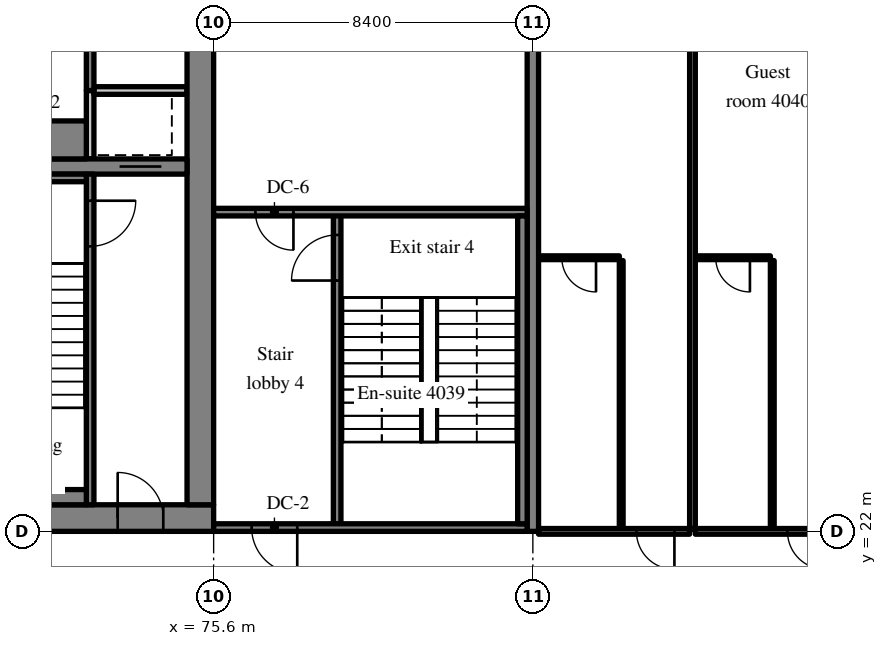
"""IFC4 building model, lengths in metres.
Left out: names, types, materials, properties, quantities, classifications, styles, units other than length and angle.
Written with IfcOpenShell. Run it as: python <this file> out.ifc"""

import sys

from ifc_helpers import new_model, si_unit, direction, frame, frame_2d, origin, place, context, subcontext, project, spatial, rectangle, extrude, source, transform, mapped, element, fill, save


model = new_model("IFC4")
c1 = context("Model", 3, precision=1e-05, world=origin(), true_north=direction((0.0, 1.0)))
c2 = subcontext(c1, "Body", "Model", "MODEL_VIEW")
j1 = project(units=[si_unit("LENGTHUNIT", "METRE"), si_unit("PLANEANGLEUNIT", "RADIAN")], contexts=[c1])
p1 = place(None, origin())
s1 = spatial("IfcSite", under=j1, at=p1, CompositionType="ELEMENT")
p2 = place(p1, origin())
s2 = spatial("IfcBuilding", under=s1, at=p2, CompositionType="ELEMENT")
p3 = place(p2, frame((0.0, 0.0, 166.8)))
s3 = spatial("IfcBuildingStorey", under=s2, at=p3, CompositionType="ELEMENT", Elevation=166.8)
m1 = source(origin(), c2, "Body", "SweptSolid", [
    extrude(rectangle(XDim=50.4, YDim=0.7, at=frame_2d((25.2, 0.0))), origin(), (0.0, 0.0, 1.0), 3.52),
])
p4 = place(p3, frame((25.2, 22.35, 0.0), z_axis=(0.0, 0.0, 1.0), x_axis=(1.0, 0.0, 0.0)))
e1 = element("IfcWall", 1, at=p4, inside=s3, PredefinedType="SHEAR", context=c2, shape_type="MappedRepresentation", body=[
    mapped(m1, transform((0.0, 0.0, 0.0), scale=1.0)),
])
m2 = source(origin(), c2, "Body", "SweptSolid", [
    extrude(rectangle(XDim=1.8, YDim=2.1, at=frame_2d((0.9, 1.05))), frame((0.0, 0.36, 0.0), z_axis=(0.0, -1.0, 0.0), x_axis=(1.0, 0.0, 0.0)), (0.0, 0.0, 1.0), 0.72),
])
p5 = place(p4, frame((15.9, 0.0, 0.0)))
e2 = element("IfcOpeningElement", 2, at=p5, cuts=e1, PredefinedType="OPENING", context=c2, shape_type="MappedRepresentation", body=[
    mapped(m2, transform((0.0, 0.0, 0.0), scale=1.0)),
])
m3 = source(origin(), c2, "Body", "SweptSolid", [
    extrude(rectangle(XDim=0.9, YDim=2.1, at=frame_2d((0.45, 1.05))), frame((0.0, 0.36, 0.0), z_axis=(0.0, -1.0, 0.0), x_axis=(1.0, 0.0, 0.0)), (0.0, 0.0, 1.0), 0.72),
])
p6 = place(p4, frame((9.7, 0.0, 0.0)))
e3 = element("IfcOpeningElement", 3, at=p6, cuts=e1, PredefinedType="OPENING", context=c2, shape_type="MappedRepresentation", body=[
    mapped(m3, transform((0.0, 0.0, 0.0), scale=1.0)),
])
p7 = place(p4, frame((21.5, 0.0, 0.0)))
e4 = element("IfcOpeningElement", 4, at=p7, cuts=e1, PredefinedType="OPENING", context=c2, shape_type="MappedRepresentation", body=[
    mapped(m3, transform((0.0, 0.0, 0.0), scale=1.0)),
])
p8 = place(p4, frame((32.7, 0.0, 0.0)))
e5 = element("IfcOpeningElement", 5, at=p8, cuts=e1, PredefinedType="OPENING", context=c2, shape_type="MappedRepresentation", body=[
    mapped(m2, transform((0.0, 0.0, 0.0), scale=1.0)),
])
m4 = source(origin(), c2, "Body", "SweptSolid", [
    extrude(rectangle(XDim=1.2, YDim=2.1, at=frame_2d((0.6, 1.05))), frame((0.0, 0.36, 0.0), z_axis=(0.0, -1.0, 0.0), x_axis=(1.0, 0.0, 0.0)), (0.0, 0.0, 1.0), 0.72),
])
p9 = place(p4, frame((6.475, 0.0, 0.0)))
e6 = element("IfcOpeningElement", 6, at=p9, cuts=e1, PredefinedType="OPENING", context=c2, shape_type="MappedRepresentation", body=[
    mapped(m4, transform((0.0, 0.0, 0.0), scale=1.0)),
])
p10 = place(p4, frame((47.875, 0.0, 0.0)))
e7 = element("IfcOpeningElement", 7, at=p10, cuts=e1, PredefinedType="OPENING", context=c2, shape_type="MappedRepresentation", body=[
    mapped(m4, transform((0.0, 0.0, 0.0), scale=1.0)),
])
m5 = source(origin(), c2, "Body", "SweptSolid", [
    extrude(rectangle(XDim=18.6, YDim=0.7, at=frame_2d((9.3, 0.0))), origin(), (0.0, 0.0, 1.0), 3.52),
])
p11 = place(p3, frame((75.25, 22.7, 0.0), z_axis=(0.0, 0.0, 1.0), x_axis=(0.0, 1.0, 0.0)))
e8 = element("IfcWall", 8, at=p11, inside=s3, PredefinedType="SHEAR", context=c2, shape_type="MappedRepresentation", body=[
    mapped(m5, transform((0.0, 0.0, 0.0), scale=1.0)),
])
p12 = place(p11, frame((12.7, 0.0, 0.0)))
e9 = element("IfcOpeningElement", 9, at=p12, cuts=e8, PredefinedType="OPENING", context=c2, shape_type="MappedRepresentation", body=[
    mapped(m4, transform((0.0, 0.0, 0.0), scale=1.0)),
])
m6 = source(origin(), c2, "Body", "SweptSolid", [
    extrude(rectangle(XDim=7.5, YDim=0.4, at=frame_2d((3.75, 0.0))), origin(), (0.0, 0.0, 1.0), 3.52),
])
p13 = place(p3, frame((67.4, 31.6, 0.0), z_axis=(0.0, 0.0, 1.0), x_axis=(1.0, 0.0, 0.0)))
e10 = element("IfcWall", 10, at=p13, inside=s3, PredefinedType="SHEAR", context=c2, shape_type="MappedRepresentation", body=[
    mapped(m6, transform((0.0, 0.0, 0.0), scale=1.0)),
])
m7 = source(origin(), c2, "Body", "SweptSolid", [
    extrude(rectangle(XDim=1.1, YDim=2.1, at=frame_2d((0.55, 1.05))), frame((0.0, 0.21, 0.0), z_axis=(0.0, -1.0, 0.0), x_axis=(1.0, 0.0, 0.0)), (0.0, 0.0, 1.0), 0.42),
])
p14 = place(p13, frame((5.725, 0.0, 0.0)))
e11 = element("IfcOpeningElement", 11, at=p14, cuts=e10, PredefinedType="OPENING", context=c2, shape_type="MappedRepresentation", body=[
    mapped(m7, transform((0.0, 0.0, 0.0), scale=1.0)),
])
m8 = source(origin(), c2, "Body", "SweptSolid", [
    extrude(rectangle(XDim=20.0, YDim=0.3, at=frame_2d((10.0, 0.0))), origin(), (0.0, 0.0, 1.0), 3.52),
])
p15 = place(p3, frame((84.0, 22.0, 0.0), z_axis=(0.0, 0.0, 1.0), x_axis=(0.0, 1.0, 0.0)))
e12 = element("IfcWall", 12, at=p15, inside=s3, PredefinedType="SHEAR", context=c2, shape_type="MappedRepresentation", body=[
    mapped(m8, transform((0.0, 0.0, 0.0), scale=1.0)),
])
m9 = source(origin(), c2, "Body", "SweptSolid", [
    extrude(rectangle(XDim=8.7, YDim=0.2, at=frame_2d((4.35, 0.0))), origin(), (0.0, 0.0, 1.0), 3.52),
])
p16 = place(p3, frame((72.35, 22.7, 0.0), z_axis=(0.0, 0.0, 1.0), x_axis=(0.0, 1.0, 0.0)))
e13 = element("IfcWall", 13, at=p16, inside=s3, PredefinedType="SOLIDWALL", context=c2, shape_type="MappedRepresentation", body=[
    mapped(m9, transform((0.0, 0.0, 0.0), scale=1.0)),
])
m10 = source(origin(), c2, "Body", "SweptSolid", [
    extrude(rectangle(XDim=1.2, YDim=2.1, at=frame_2d((0.6, 1.05))), frame((0.0, 0.11, 0.0), z_axis=(0.0, -1.0, 0.0), x_axis=(1.0, 0.0, 0.0)), (0.0, 0.0, 1.0), 0.22),
])
p17 = place(p16, frame((6.8, 0.0, 0.0)))
e14 = element("IfcOpeningElement", 14, at=p17, cuts=e13, PredefinedType="OPENING", context=c2, shape_type="MappedRepresentation", body=[
    mapped(m10, transform((0.0, 0.0, 0.0), scale=1.0)),
])
m11 = source(origin(), c2, "Body", "SweptSolid", [
    extrude(rectangle(XDim=1.8, YDim=0.2, at=frame_2d((0.9, 0.0))), origin(), (0.0, 0.0, 1.0), 3.52),
])
p18 = place(p3, frame((72.35, 31.8, 0.0), z_axis=(0.0, 0.0, 1.0), x_axis=(0.0, 1.0, 0.0)))
e15 = element("IfcWall", 15, at=p18, inside=s3, PredefinedType="SOLIDWALL", context=c2, shape_type="MappedRepresentation", body=[
    mapped(m11, transform((0.0, 0.0, 0.0), scale=1.0)),
])
m12 = source(origin(), c2, "Body", "SweptSolid", [
    extrude(rectangle(XDim=2.45, YDim=0.2, at=frame_2d((1.225, 0.0))), origin(), (0.0, 0.0, 1.0), 3.52),
])
p19 = place(p3, frame((72.45, 33.6, 0.0), z_axis=(0.0, 0.0, 1.0), x_axis=(1.0, 0.0, 0.0)))
e16 = element("IfcWall", 16, at=p19, inside=s3, PredefinedType="SOLIDWALL", context=c2, shape_type="MappedRepresentation", body=[
    mapped(m12, transform((0.0, 0.0, 0.0), scale=1.0)),
])
m13 = source(origin(), c2, "Body", "SweptSolid", [
    extrude(rectangle(XDim=7.7, YDim=0.2, at=frame_2d((3.85, 0.0))), origin(), (0.0, 0.0, 1.0), 3.52),
])
p20 = place(p3, frame((72.35, 33.6, 0.0), z_axis=(0.0, 0.0, 1.0), x_axis=(0.0, 1.0, 0.0)))
e17 = element("IfcWall", 17, at=p20, inside=s3, PredefinedType="SOLIDWALL", context=c2, shape_type="MappedRepresentation", body=[
    mapped(m13, transform((0.0, 0.0, 0.0), scale=1.0)),
])
m14 = source(origin(), c2, "Body", "SweptSolid", [
    extrude(rectangle(XDim=1.8, YDim=2.1, at=frame_2d((0.9, 1.05))), frame((0.0, 0.11, 0.0), z_axis=(0.0, -1.0, 0.0), x_axis=(1.0, 0.0, 0.0)), (0.0, 0.0, 1.0), 0.22),
])
p21 = place(p20, frame((5.3, 0.0, 0.0)))
e18 = element("IfcOpeningElement", 18, at=p21, cuts=e17, PredefinedType="OPENING", context=c2, shape_type="MappedRepresentation", body=[
    mapped(m14, transform((0.0, 0.0, 0.0), scale=1.0)),
])
m15 = source(origin(), c2, "Body", "SweptSolid", [
    extrude(rectangle(XDim=8.3, YDim=0.2, at=frame_2d((4.15, 0.0))), origin(), (0.0, 0.0, 1.0), 3.52),
])
p22 = place(p3, frame((78.85, 22.1, 0.0), z_axis=(0.0, 0.0, 1.0), x_axis=(0.0, 1.0, 0.0)))
e19 = element("IfcWall", 19, at=p22, inside=s3, PredefinedType="SOLIDWALL", context=c2, shape_type="MappedRepresentation", body=[
    mapped(m15, transform((0.0, 0.0, 0.0), scale=1.0)),
])
p23 = place(p22, frame((6.5, 0.0, 0.0)))
e20 = element("IfcOpeningElement", 20, at=p23, cuts=e19, PredefinedType="OPENING", context=c2, shape_type="MappedRepresentation", body=[
    mapped(m10, transform((0.0, 0.0, 0.0), scale=1.0)),
])
m16 = source(origin(), c2, "Body", "SweptSolid", [
    extrude(rectangle(XDim=8.25, YDim=0.2, at=frame_2d((4.125, 0.0))), origin(), (0.0, 0.0, 1.0), 3.52),
])
p24 = place(p3, frame((83.85, 22.1, 0.0), z_axis=(0.0, 0.0, 1.0), x_axis=(-1.0, 0.0, 0.0)))
e21 = element("IfcWall", 21, at=p24, inside=s3, PredefinedType="SOLIDWALL", context=c2, shape_type="MappedRepresentation", body=[
    mapped(m16, transform((0.0, 0.0, 0.0), scale=1.0)),
])
p25 = place(p24, frame((6.05, 0.0, 0.0)))
e22 = element("IfcOpeningElement", 22, at=p25, cuts=e21, PredefinedType="OPENING", context=c2, shape_type="MappedRepresentation", body=[
    mapped(m10, transform((0.0, 0.0, 0.0), scale=1.0)),
])
p26 = place(p3, frame((83.85, 30.4, 0.0), z_axis=(0.0, 0.0, 1.0), x_axis=(-1.0, 0.0, 0.0)))
e23 = element("IfcWall", 23, at=p26, inside=s3, PredefinedType="SOLIDWALL", context=c2, shape_type="MappedRepresentation", body=[
    mapped(m16, transform((0.0, 0.0, 0.0), scale=1.0)),
])
m17 = source(origin(), c2, "Body", "SweptSolid", [
    extrude(rectangle(XDim=1.0, YDim=2.1, at=frame_2d((0.5, 1.05))), frame((0.0, 0.11, 0.0), z_axis=(0.0, -1.0, 0.0), x_axis=(1.0, 0.0, 0.0)), (0.0, 0.0, 1.0), 0.22),
])
p27 = place(p26, frame((6.15, 0.0, 0.0)))
e24 = element("IfcOpeningElement", 24, at=p27, cuts=e23, PredefinedType="OPENING", context=c2, shape_type="MappedRepresentation", body=[
    mapped(m17, transform((0.0, 0.0, 0.0), scale=1.0)),
])
m18 = source(origin(), c2, "Body", "SweptSolid", [
    extrude(rectangle(XDim=4.85, YDim=0.4, at=frame_2d((2.425, 0.0))), origin(), (0.0, 0.0, 1.0), 3.52),
])
p28 = place(p3, frame((67.4, 22.9, 0.0), z_axis=(0.0, 0.0, 1.0), x_axis=(1.0, 0.0, 0.0)))
e25 = element("IfcWall", 25, at=p28, inside=s3, PredefinedType="SOLIDWALL", context=c2, shape_type="MappedRepresentation", body=[
    mapped(m18, transform((0.0, 0.0, 0.0), scale=1.0)),
])
m19 = source(origin(), c2, "Body", "SweptSolid", [
    extrude(rectangle(XDim=4.85, YDim=0.2, at=frame_2d((2.425, 0.0))), origin(), (0.0, 0.0, 1.0), 3.52),
])
p29 = place(p3, frame((67.4, 31.3, 0.0), z_axis=(0.0, 0.0, 1.0), x_axis=(1.0, 0.0, 0.0)))
e26 = element("IfcWall", 26, at=p29, inside=s3, PredefinedType="SOLIDWALL", context=c2, shape_type="MappedRepresentation", body=[
    mapped(m19, transform((0.0, 0.0, 0.0), scale=1.0)),
])
m20 = source(origin(), c2, "Body", "SweptSolid", [
    extrude(rectangle(XDim=4.85, YDim=1.0, at=frame_2d((2.425, 0.0))), origin(), (0.0, 0.0, 1.0), 3.52),
])
p30 = place(p3, frame((67.4, 32.3, 0.0), z_axis=(0.0, 0.0, 1.0), x_axis=(1.0, 0.0, 0.0)))
e27 = element("IfcWall", 27, at=p30, inside=s3, PredefinedType="SOLIDWALL", context=c2, shape_type="MappedRepresentation", body=[
    mapped(m20, transform((0.0, 0.0, 0.0), scale=1.0)),
])
m21 = source(origin(), c2, "Body", "SweptSolid", [
    extrude(rectangle(XDim=8.1, YDim=0.25, at=frame_2d((4.05, 0.0))), origin(), (0.0, 0.0, 1.0), 3.52),
])
p31 = place(p3, frame((83.725, 22.2, 0.0), z_axis=(0.0, 0.0, 1.0), x_axis=(0.0, 1.0, 0.0)))
e28 = element("IfcWall", 28, at=p31, inside=s3, PredefinedType="SOLIDWALL", context=c2, shape_type="MappedRepresentation", body=[
    mapped(m21, transform((0.0, 0.0, 0.0), scale=1.0)),
])
m22 = source(origin(), c2, "Body", "SweptSolid", [
    extrude(rectangle(XDim=7.05, YDim=0.1, at=frame_2d((3.525, 0.0))), origin(), (0.0, 0.0, 1.0), 3.52),
])
p32 = place(p3, frame((86.325, 22.075, 0.0), z_axis=(0.0, 0.0, 1.0), x_axis=(0.0, 1.0, 0.0)))
e29 = element("IfcWall", 29, at=p32, inside=s3, PredefinedType="PARTITIONING", context=c2, shape_type="MappedRepresentation", body=[
    mapped(m22, transform((0.0, 0.0, 0.0), scale=1.0)),
])
m23 = source(origin(), c2, "Body", "SweptSolid", [
    extrude(rectangle(XDim=2.125, YDim=0.1, at=frame_2d((1.062, 0.0))), origin(), (0.0, 0.0, 1.0), 3.52),
])
p33 = place(p3, frame((84.15, 29.2, 0.0), z_axis=(0.0, 0.0, 1.0), x_axis=(1.0, 0.0, 0.0)))
e30 = element("IfcWall", 30, at=p33, inside=s3, PredefinedType="PARTITIONING", context=c2, shape_type="MappedRepresentation", body=[
    mapped(m23, transform((0.0, 0.0, 0.0), scale=1.0)),
])
m24 = source(origin(), c2, "Body", "SweptSolid", [
    extrude(rectangle(XDim=0.9, YDim=2.1, at=frame_2d((0.45, 1.05))), frame((0.0, 0.06, 0.0), z_axis=(0.0, -1.0, 0.0), x_axis=(1.0, 0.0, 0.0)), (0.0, 0.0, 1.0), 0.12),
])
p34 = place(p33, frame((0.612, 0.0, 0.0)))
e31 = element("IfcOpeningElement", 31, at=p34, cuts=e30, PredefinedType="OPENING", context=c2, shape_type="MappedRepresentation", body=[
    mapped(m24, transform((0.0, 0.0, 0.0), scale=1.0)),
])
m25 = source(origin(), c2, "Body", "SweptSolid", [
    extrude(rectangle(XDim=3.975, YDim=0.15, at=frame_2d((1.988, 0.0))), origin(), (0.0, 0.0, 1.0), 2.82),
])
p35 = place(p3, frame((84.15, 22.0, 0.0), z_axis=(0.0, 0.0, 1.0), x_axis=(1.0, 0.0, 0.0)))
e32 = element("IfcWall", 32, at=p35, inside=s3, PredefinedType="PARTITIONING", context=c2, shape_type="MappedRepresentation", body=[
    mapped(m25, transform((0.0, 0.0, 0.0), scale=1.0)),
])
m26 = source(origin(), c2, "Body", "SweptSolid", [
    extrude(rectangle(XDim=1.0, YDim=2.1, at=frame_2d((0.5, 1.05))), frame((0.0, 0.085, 0.0), z_axis=(0.0, -1.0, 0.0), x_axis=(1.0, 0.0, 0.0)), (0.0, 0.0, 1.0), 0.17),
])
p36 = place(p35, frame((2.575, 0.0, 0.0)))
e33 = element("IfcOpeningElement", 33, at=p36, cuts=e32, PredefinedType="OPENING", context=c2, shape_type="MappedRepresentation", body=[
    mapped(m26, transform((0.0, 0.0, 0.0), scale=1.0)),
])
p37 = place(p3, frame((90.3, 22.075, 0.0), z_axis=(0.0, 0.0, 1.0), x_axis=(0.0, 1.0, 0.0)))
e34 = element("IfcWall", 34, at=p37, inside=s3, PredefinedType="PARTITIONING", context=c2, shape_type="MappedRepresentation", body=[
    mapped(m22, transform((0.0, 0.0, 0.0), scale=1.0)),
])
m27 = source(origin(), c2, "Body", "SweptSolid", [
    extrude(rectangle(XDim=1.975, YDim=0.1, at=frame_2d((0.988, 0.0))), origin(), (0.0, 0.0, 1.0), 3.52),
])
p38 = place(p3, frame((88.275, 29.2, 0.0), z_axis=(0.0, 0.0, 1.0), x_axis=(1.0, 0.0, 0.0)))
e35 = element("IfcWall", 35, at=p38, inside=s3, PredefinedType="PARTITIONING", context=c2, shape_type="MappedRepresentation", body=[
    mapped(m27, transform((0.0, 0.0, 0.0), scale=1.0)),
])
p39 = place(p38, frame((0.537, 0.0, 0.0)))
e36 = element("IfcOpeningElement", 36, at=p39, cuts=e35, PredefinedType="OPENING", context=c2, shape_type="MappedRepresentation", body=[
    mapped(m24, transform((0.0, 0.0, 0.0), scale=1.0)),
])
m28 = source(origin(), c2, "Body", "SweptSolid", [
    extrude(rectangle(XDim=3.825, YDim=0.15, at=frame_2d((1.913, 0.0))), origin(), (0.0, 0.0, 1.0), 2.82),
])
p40 = place(p3, frame((88.275, 22.0, 0.0), z_axis=(0.0, 0.0, 1.0), x_axis=(1.0, 0.0, 0.0)))
e37 = element("IfcWall", 37, at=p40, inside=s3, PredefinedType="PARTITIONING", context=c2, shape_type="MappedRepresentation", body=[
    mapped(m28, transform((0.0, 0.0, 0.0), scale=1.0)),
])
p41 = place(p40, frame((2.425, 0.0, 0.0)))
e38 = element("IfcOpeningElement", 38, at=p41, cuts=e37, PredefinedType="OPENING", context=c2, shape_type="MappedRepresentation", body=[
    mapped(m26, transform((0.0, 0.0, 0.0), scale=1.0)),
])
m29 = source(origin(), c2, "Body", "SweptSolid", [
    extrude(rectangle(XDim=19.347, YDim=0.15, at=frame_2d((9.674, 0.0))), origin(), (0.0, 0.0, 1.0), 3.52),
])
p42 = place(p3, frame((88.2, 22.075, 0.0), z_axis=(0.0, 0.0, 1.0), x_axis=(0.0, 1.0, 0.0)))
e39 = element("IfcWall", 39, at=p42, inside=s3, PredefinedType="PARTITIONING", context=c2, shape_type="MappedRepresentation", body=[
    mapped(m29, transform((0.0, 0.0, 0.0), scale=1.0)),
])
m30 = source(origin(), c2, "Body", "SweptSolid", [
    extrude(rectangle(XDim=1.2, YDim=2.1, at=frame_2d((0.6, 1.05))), frame((0.0, 0.025, 0.0), z_axis=(0.0, -1.0, 0.0), x_axis=(1.0, 0.0, 0.0)), (0.0, 0.0, 1.0), 0.05),
])
p43 = place(p17, origin())
e40 = element("IfcDoor", 40, at=p43, inside=s3, OperationType="SINGLE_SWING_RIGHT", PredefinedType="DOOR", context=c2, shape_type="MappedRepresentation", body=[
    mapped(m30, transform((0.0, 0.0, 0.0), scale=1.0)),
])
fill(e14, e40)
m31 = source(origin(), c2, "Body", "SweptSolid", [
    extrude(rectangle(XDim=1.2, YDim=2.1, at=frame_2d((0.6, 1.05))), frame((0.0, 0.275, 0.0), z_axis=(0.0, -1.0, 0.0), x_axis=(1.0, 0.0, 0.0)), (0.0, 0.0, 1.0), 0.05),
])
p44 = place(p10, origin())
e41 = element("IfcDoor", 41, at=p44, inside=s3, OperationType="SINGLE_SWING_LEFT", PredefinedType="DOOR", context=c2, shape_type="MappedRepresentation", body=[
    mapped(m31, transform((0.0, 0.0, 0.0), scale=1.0)),
])
fill(e7, e41)
m32 = source(origin(), c2, "Body", "SweptSolid", [
    extrude(rectangle(XDim=1.1, YDim=2.1, at=frame_2d((0.55, 1.05))), frame((0.0, 0.025, 0.0), z_axis=(0.0, -1.0, 0.0), x_axis=(1.0, 0.0, 0.0)), (0.0, 0.0, 1.0), 0.05),
])
p45 = place(p14, origin())
e42 = element("IfcDoor", 42, at=p45, inside=s3, OperationType="SLIDING_TO_LEFT", PredefinedType="DOOR", context=c2, shape_type="MappedRepresentation", body=[
    mapped(m32, transform((0.0, 0.0, 0.0), scale=1.0)),
])
fill(e11, e42)
p46 = place(p23, origin())
e43 = element("IfcDoor", 43, at=p46, inside=s3, OperationType="SINGLE_SWING_LEFT", PredefinedType="DOOR", context=c2, shape_type="MappedRepresentation", body=[
    mapped(m30, transform((0.0, 0.0, 0.0), scale=1.0)),
])
fill(e20, e43)
p47 = place(p25, origin())
e44 = element("IfcDoor", 44, at=p47, inside=s3, OperationType="SINGLE_SWING_LEFT", PredefinedType="DOOR", context=c2, shape_type="MappedRepresentation", body=[
    mapped(m30, transform((0.0, 0.0, 0.0), scale=1.0)),
])
fill(e22, e44)
m33 = source(origin(), c2, "Body", "SweptSolid", [
    extrude(rectangle(XDim=1.0, YDim=2.1, at=frame_2d((0.5, 1.05))), frame((0.0, 0.025, 0.0), z_axis=(0.0, -1.0, 0.0), x_axis=(1.0, 0.0, 0.0)), (0.0, 0.0, 1.0), 0.05),
])
p48 = place(p27, origin())
e45 = element("IfcDoor", 45, at=p48, inside=s3, OperationType="SINGLE_SWING_LEFT", PredefinedType="DOOR", context=c2, shape_type="MappedRepresentation", body=[
    mapped(m33, transform((0.0, 0.0, 0.0), scale=1.0)),
])
fill(e24, e45)
m34 = source(origin(), c2, "Body", "SweptSolid", [
    extrude(rectangle(XDim=0.9, YDim=2.1, at=frame_2d((0.45, 1.05))), frame((0.0, 0.025, 0.0), z_axis=(0.0, -1.0, 0.0), x_axis=(1.0, 0.0, 0.0)), (0.0, 0.0, 1.0), 0.05),
])
p49 = place(p34, origin())
e46 = element("IfcDoor", 46, at=p49, inside=s3, OperationType="SINGLE_SWING_RIGHT", PredefinedType="DOOR", context=c2, shape_type="MappedRepresentation", body=[
    mapped(m34, transform((0.0, 0.0, 0.0), scale=1.0)),
])
fill(e31, e46)
p50 = place(p36, origin())
e47 = element("IfcDoor", 47, at=p50, inside=s3, OperationType="SINGLE_SWING_RIGHT", PredefinedType="DOOR", context=c2, shape_type="MappedRepresentation", body=[
    mapped(m33, transform((0.0, 0.0, 0.0), scale=1.0)),
])
fill(e33, e47)
p51 = place(p39, origin())
e48 = element("IfcDoor", 48, at=p51, inside=s3, OperationType="SINGLE_SWING_RIGHT", PredefinedType="DOOR", context=c2, shape_type="MappedRepresentation", body=[
    mapped(m34, transform((0.0, 0.0, 0.0), scale=1.0)),
])
fill(e36, e48)
p52 = place(p41, origin())
e49 = element("IfcDoor", 49, at=p52, inside=s3, OperationType="SINGLE_SWING_RIGHT", PredefinedType="DOOR", context=c2, shape_type="MappedRepresentation", body=[
    mapped(m33, transform((0.0, 0.0, 0.0), scale=1.0)),
])
fill(e38, e49)
save(model, sys.argv[1])
